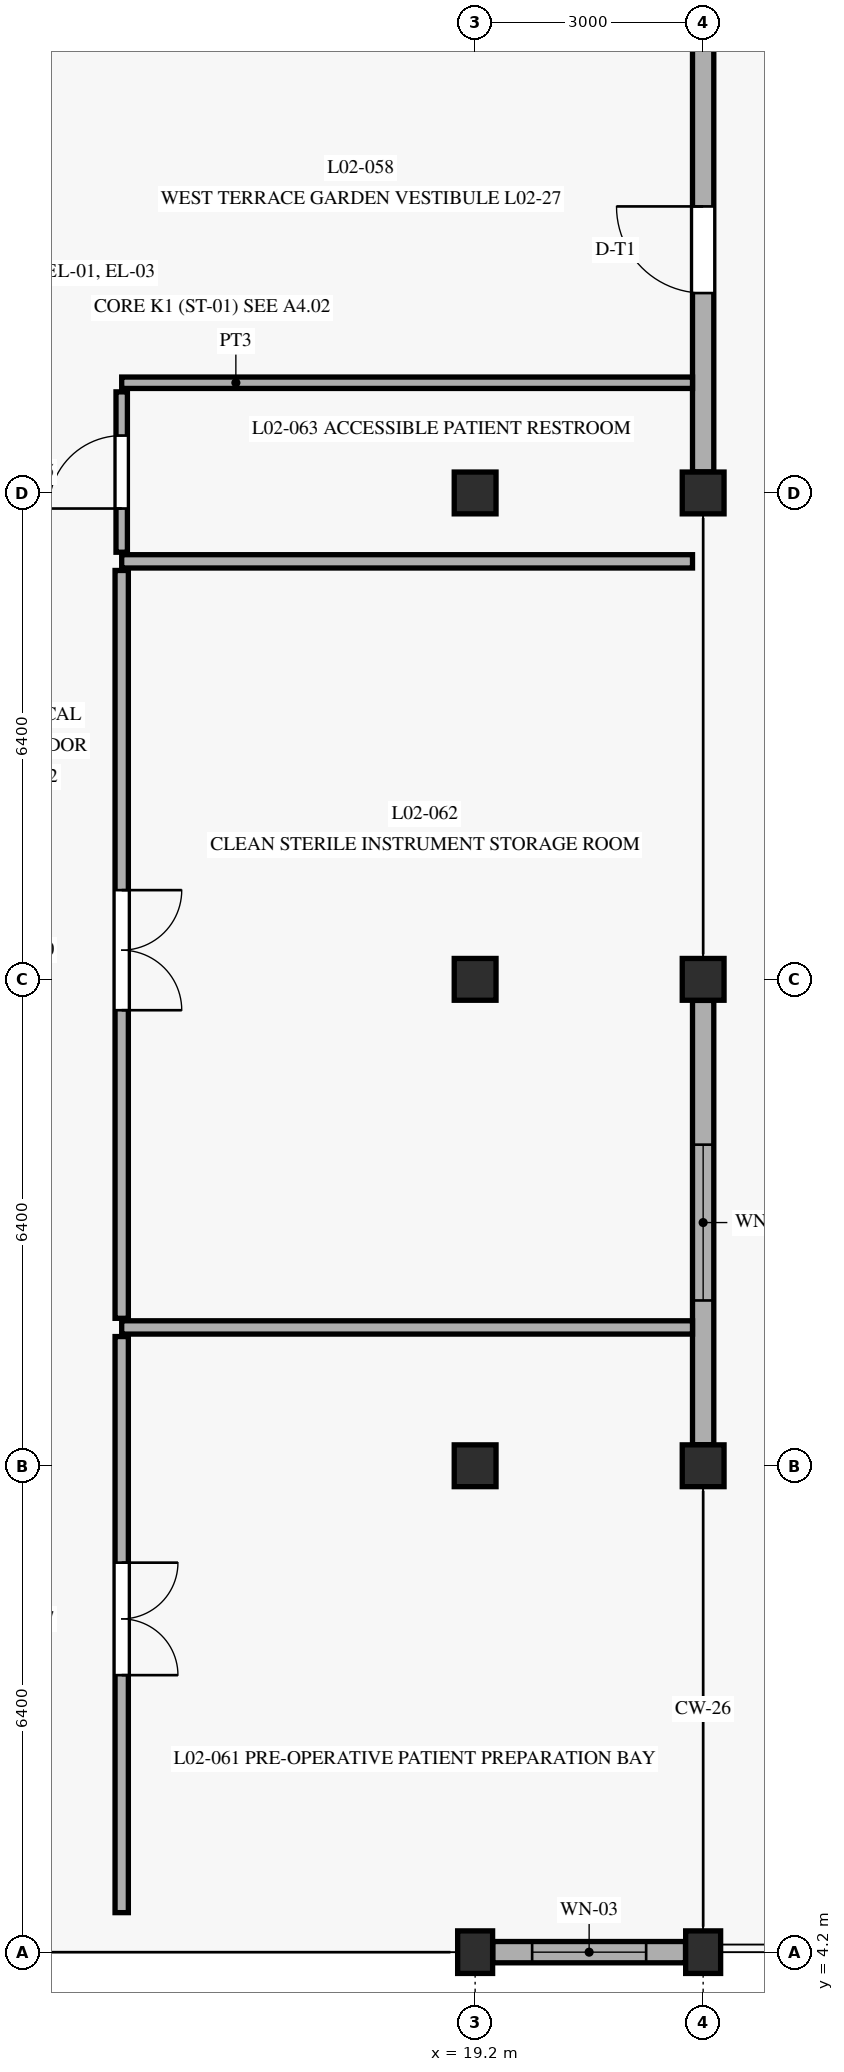
"""IFC4 building model, lengths in metres.
Left out: names, types, materials, properties, quantities, classifications, styles, units other than length and angle.
Written with IfcOpenShell. Run it as: python <this file> out.ifc"""

import sys

from ifc_helpers import new_model, si_unit, direction, frame, frame_2d, origin, origin_with_axes, origin_2d, place, context, subcontext, project, spatial, rectangle, extrude, element, fill, save


model = new_model("IFC4")
c1 = context("Model", 3, precision=1e-05, world=origin(), true_north=direction((0.0, 1.0)))
c2 = subcontext(c1, "Body", "Model", "MODEL_VIEW")
j1 = project(units=[si_unit("LENGTHUNIT", "METRE"), si_unit("PLANEANGLEUNIT", "RADIAN")], contexts=[c1])
p1 = place(None, origin())
s1 = spatial("IfcSite", under=j1, at=p1, CompositionType="ELEMENT")
p2 = place(p1, origin())
s2 = spatial("IfcBuilding", under=s1, at=p2, CompositionType="ELEMENT")
p3 = place(p2, frame((0.0, 0.0, 4.8)))
s3 = spatial("IfcBuildingStorey", under=s2, at=p3, CompositionType="ELEMENT", Elevation=4.8)
p4 = place(p3, frame((19.2, 4.2, 0.0), z_axis=(0.0, 0.0, 1.0), x_axis=(1.0, 0.0, 0.0)))
e1 = element("IfcColumn", 1, at=p4, inside=s3, PredefinedType="COLUMN", context=c2, shape_type="SweptSolid", body=[
    extrude(rectangle(XDim=0.46, YDim=0.56, at=origin_2d()), origin(), (0.0, 0.0, 1.0), 4.5),
])
for number, where, z_axis, x_axis in (
    (2, (19.2, 10.6, 0.0), (0.0, 0.0, 1.0), (1.0, 0.0, 0.0)),
    (3, (19.2, 17.0, 0.0), (0.0, 0.0, 1.0), (1.0, 0.0, 0.0)),
    (4, (19.2, 23.4, 0.0), (0.0, 0.0, 1.0), (1.0, 0.0, 0.0)),
):
    element("IfcColumn", number, at=place(p3, frame(where, z_axis=z_axis, x_axis=x_axis)), inside=s3, PredefinedType="COLUMN", context=c2, shape_type="SweptSolid", body=[
        extrude(rectangle(XDim=0.55, YDim=0.55, at=origin_2d()), origin(), (0.0, 0.0, 1.0), 4.5),
    ])
p5 = place(p3, frame((22.2, 4.2, 0.0), z_axis=(0.0, 0.0, 1.0), x_axis=(1.0, 0.0, 0.0)))
e5 = element("IfcColumn", 5, at=p5, inside=s3, PredefinedType="COLUMN", context=c2, shape_type="SweptSolid", body=[
    extrude(rectangle(XDim=0.46, YDim=0.56, at=origin_2d()), origin(), (0.0, 0.0, 1.0), 4.5),
])
for number, where, z_axis, x_axis in (
    (6, (22.2, 10.6, 0.0), (0.0, 0.0, 1.0), (1.0, 0.0, 0.0)),
    (7, (22.2, 17.0, 0.0), (0.0, 0.0, 1.0), (1.0, 0.0, 0.0)),
    (8, (22.2, 23.4, 0.0), (0.0, 0.0, 1.0), (1.0, 0.0, 0.0)),
):
    element("IfcColumn", number, at=place(p3, frame(where, z_axis=z_axis, x_axis=x_axis)), inside=s3, PredefinedType="COLUMN", context=c2, shape_type="SweptSolid", body=[
        extrude(rectangle(XDim=0.55, YDim=0.55, at=origin_2d()), origin(), (0.0, 0.0, 1.0), 4.5),
    ])
p6 = place(p3, frame((22.2, 10.877, 0.0), z_axis=(0.0, 0.0, 1.0), x_axis=(0.0, 1.0, 0.0)))
e9 = element("IfcWall", 9, at=p6, inside=s3, PredefinedType="SOLIDWALL", context=c2, shape_type="SweptSolid", body=[
    extrude(rectangle(XDim=5.846, YDim=0.28, at=frame_2d((2.923, 0.0))), origin(), (0.0, 0.0, 1.0), 3.79),
])
p7 = place(p6, frame((1.898, 0.0, 0.8)))
e10 = element("IfcOpeningElement", 10, at=p7, cuts=e9, PredefinedType="OPENING", context=c2, shape_type="SweptSolid", body=[
    extrude(rectangle(XDim=2.05, YDim=1.95, at=frame_2d((1.025, 0.975))), frame((0.0, 0.15, 0.0), z_axis=(0.0, -1.0, 0.0), x_axis=(1.0, 0.0, 0.0)), (0.0, 0.0, 1.0), 0.3),
])
p8 = place(p3, frame((22.2, 23.677, 0.0), z_axis=(0.0, 0.0, 1.0), x_axis=(0.0, 1.0, 0.0)))
e11 = element("IfcWall", 11, at=p8, inside=s3, PredefinedType="SOLIDWALL", context=c2, shape_type="SweptSolid", body=[
    extrude(rectangle(XDim=5.846, YDim=0.28, at=frame_2d((2.923, 0.0))), origin(), (0.0, 0.0, 1.0), 3.79),
])
p9 = place(p8, frame((2.353, 0.0, 0.0)))
e12 = element("IfcOpeningElement", 12, at=p9, cuts=e11, PredefinedType="OPENING", context=c2, shape_type="SweptSolid", body=[
    extrude(rectangle(XDim=1.14, YDim=2.3, at=frame_2d((0.57, 1.15))), frame((0.0, 0.15, 0.0), z_axis=(0.0, -1.0, 0.0), x_axis=(1.0, 0.0, 0.0)), (0.0, 0.0, 1.0), 0.3),
])
p10 = place(p3, frame((19.432, 4.2, 0.0), z_axis=(0.0, 0.0, 1.0), x_axis=(1.0, 0.0, 0.0)))
e13 = element("IfcWall", 13, at=p10, inside=s3, PredefinedType="SOLIDWALL", context=c2, shape_type="SweptSolid", body=[
    extrude(rectangle(XDim=2.536, YDim=0.28, at=frame_2d((1.268, 0.0))), origin(), (0.0, 0.0, 1.0), 3.75),
])
p11 = place(p10, frame((0.518, 0.0, 0.9)))
e14 = element("IfcOpeningElement", 14, at=p11, cuts=e13, PredefinedType="OPENING", context=c2, shape_type="SweptSolid", body=[
    extrude(rectangle(XDim=1.5, YDim=2.2, at=frame_2d((0.75, 1.1))), frame((0.0, 0.15, 0.0), z_axis=(0.0, -1.0, 0.0), x_axis=(1.0, 0.0, 0.0)), (0.0, 0.0, 1.0), 0.3),
])
p12 = place(p3, frame((14.55, 4.72, 0.0), z_axis=(0.0, 0.0, 1.0), x_axis=(0.0, 1.0, 0.0)))
e15 = element("IfcWall", 15, at=p12, inside=s3, PredefinedType="PARTITIONING", context=c2, shape_type="SweptSolid", body=[
    extrude(rectangle(XDim=7.58, YDim=0.175, at=frame_2d((3.79, 0.0))), origin(), (0.0, 0.0, 1.0), 3.795),
])
p13 = place(p12, frame((3.125, 0.0, 0.0)))
e16 = element("IfcOpeningElement", 16, at=p13, cuts=e15, PredefinedType="OPENING", context=c2, shape_type="SweptSolid", body=[
    extrude(rectangle(XDim=1.48, YDim=2.28, at=frame_2d((0.74, 1.14))), frame((0.0, 0.098, 0.0), z_axis=(0.0, -1.0, 0.0), x_axis=(1.0, 0.0, 0.0)), (0.0, 0.0, 1.0), 0.195),
])
p14 = place(p3, frame((14.55, 12.42, 0.0), z_axis=(0.0, 0.0, 1.0), x_axis=(1.0, 0.0, 0.0)))
e17 = element("IfcWall", 17, at=p14, inside=s3, PredefinedType="PARTITIONING", context=c2, shape_type="SweptSolid", body=[
    extrude(rectangle(XDim=7.51, YDim=0.175, at=frame_2d((3.755, 0.0))), origin(), (0.0, 0.0, 1.0), 3.785),
])
p15 = place(p3, frame((14.55, 12.54, 0.0), z_axis=(0.0, 0.0, 1.0), x_axis=(0.0, 1.0, 0.0)))
e18 = element("IfcWall", 18, at=p15, inside=s3, PredefinedType="PARTITIONING", context=c2, shape_type="SweptSolid", body=[
    extrude(rectangle(XDim=9.84, YDim=0.175, at=frame_2d((4.92, 0.0))), origin(), (0.0, 0.0, 1.0), 3.795),
])
p16 = place(p15, frame((4.054, 0.0, 0.0)))
e19 = element("IfcOpeningElement", 19, at=p16, cuts=e18, PredefinedType="OPENING", context=c2, shape_type="SweptSolid", body=[
    extrude(rectangle(XDim=1.58, YDim=2.26, at=frame_2d((0.79, 1.13))), frame((0.0, 0.098, 0.0), z_axis=(0.0, -1.0, 0.0), x_axis=(1.0, 0.0, 0.0)), (0.0, 0.0, 1.0), 0.195),
])
p17 = place(p3, frame((14.55, 22.5, 0.0), z_axis=(0.0, 0.0, 1.0), x_axis=(1.0, 0.0, 0.0)))
e20 = element("IfcWall", 20, at=p17, inside=s3, PredefinedType="PARTITIONING", context=c2, shape_type="SweptSolid", body=[
    extrude(rectangle(XDim=7.51, YDim=0.175, at=frame_2d((3.755, 0.0))), origin(), (0.0, 0.0, 1.0), 3.785),
])
p18 = place(p3, frame((14.55, 22.62, 0.0), z_axis=(0.0, 0.0, 1.0), x_axis=(0.0, 1.0, 0.0)))
e21 = element("IfcWall", 21, at=p18, inside=s3, PredefinedType="PARTITIONING", context=c2, shape_type="SweptSolid", body=[
    extrude(rectangle(XDim=2.11, YDim=0.15, at=frame_2d((1.055, 0.0))), origin(), (0.0, 0.0, 1.0), 3.795),
])
p19 = place(p18, frame((0.575, 0.0, 0.0)))
e22 = element("IfcOpeningElement", 22, at=p19, cuts=e21, PredefinedType="OPENING", context=c2, shape_type="SweptSolid", body=[
    extrude(rectangle(XDim=0.96, YDim=2.1, at=frame_2d((0.48, 1.05))), frame((0.0, 0.085, 0.0), z_axis=(0.0, -1.0, 0.0), x_axis=(1.0, 0.0, 0.0)), (0.0, 0.0, 1.0), 0.17),
])
p20 = place(p3, frame((14.55, 24.85, 0.0), z_axis=(0.0, 0.0, 1.0), x_axis=(1.0, 0.0, 0.0)))
e23 = element("IfcWall", 23, at=p20, inside=s3, PredefinedType="PARTITIONING", context=c2, shape_type="SweptSolid", body=[
    extrude(rectangle(XDim=7.51, YDim=0.15, at=frame_2d((3.755, 0.0))), origin(), (0.0, 0.0, 1.0), 3.785),
])
p21 = place(p7, origin_with_axes())
e24 = element("IfcWindow", 24, at=p21, inside=s3, PartitioningType="SINGLE_PANEL", PredefinedType="WINDOW", context=c2, shape_type="SweptSolid", body=[
    extrude(rectangle(XDim=2.05, YDim=1.95, at=frame_2d((1.025, 0.975))), frame((0.0, 0.03, 0.0), z_axis=(0.0, -1.0, 0.0), x_axis=(1.0, 0.0, 0.0)), (0.0, 0.0, 1.0), 0.06),
])
fill(e10, e24)
p22 = place(p9, frame((1.14, 0.0, 0.0), z_axis=(0.0, 0.0, 1.0), x_axis=(-1.0, 0.0, 0.0)))
e25 = element("IfcDoor", 25, at=p22, inside=s3, OperationType="SINGLE_SWING_LEFT", PredefinedType="DOOR", context=c2, shape_type="SweptSolid", body=[
    extrude(rectangle(XDim=1.14, YDim=2.3, at=frame_2d((0.57, 1.15))), frame((0.0, 0.025, 0.0), z_axis=(0.0, -1.0, 0.0), x_axis=(1.0, 0.0, 0.0)), (0.0, 0.0, 1.0), 0.05),
])
fill(e12, e25)
p23 = place(p11, origin_with_axes())
e26 = element("IfcWindow", 26, at=p23, inside=s3, PartitioningType="SINGLE_PANEL", PredefinedType="WINDOW", context=c2, shape_type="SweptSolid", body=[
    extrude(rectangle(XDim=1.5, YDim=2.2, at=frame_2d((0.75, 1.1))), frame((0.0, 0.03, 0.0), z_axis=(0.0, -1.0, 0.0), x_axis=(1.0, 0.0, 0.0)), (0.0, 0.0, 1.0), 0.06),
])
fill(e14, e26)
p24 = place(p13, frame((1.48, 0.0, 0.0), z_axis=(0.0, 0.0, 1.0), x_axis=(-1.0, 0.0, 0.0)))
e27 = element("IfcDoor", 27, at=p24, inside=s3, OperationType="DOUBLE_DOOR_SINGLE_SWING", PredefinedType="DOOR", context=c2, shape_type="SweptSolid", body=[
    extrude(rectangle(XDim=1.48, YDim=2.28, at=frame_2d((0.74, 1.14))), frame((0.0, 0.025, 0.0), z_axis=(0.0, -1.0, 0.0), x_axis=(1.0, 0.0, 0.0)), (0.0, 0.0, 1.0), 0.05),
])
fill(e16, e27)
p25 = place(p16, frame((1.58, 0.0, 0.0), z_axis=(0.0, 0.0, 1.0), x_axis=(-1.0, 0.0, 0.0)))
e28 = element("IfcDoor", 28, at=p25, inside=s3, OperationType="DOUBLE_DOOR_SINGLE_SWING", PredefinedType="DOOR", context=c2, shape_type="SweptSolid", body=[
    extrude(rectangle(XDim=1.58, YDim=2.26, at=frame_2d((0.79, 1.13))), frame((0.0, 0.025, 0.0), z_axis=(0.0, -1.0, 0.0), x_axis=(1.0, 0.0, 0.0)), (0.0, 0.0, 1.0), 0.05),
])
fill(e19, e28)
p26 = place(p19, frame((0.96, 0.0, 0.0), z_axis=(0.0, 0.0, 1.0), x_axis=(-1.0, 0.0, 0.0)))
e29 = element("IfcDoor", 29, at=p26, inside=s3, OperationType="SINGLE_SWING_RIGHT", PredefinedType="DOOR", context=c2, shape_type="SweptSolid", body=[
    extrude(rectangle(XDim=0.96, YDim=2.1, at=frame_2d((0.48, 1.05))), frame((0.0, 0.025, 0.0), z_axis=(0.0, -1.0, 0.0), x_axis=(1.0, 0.0, 0.0)), (0.0, 0.0, 1.0), 0.05),
])
fill(e22, e29)
save(model, sys.argv[1])
